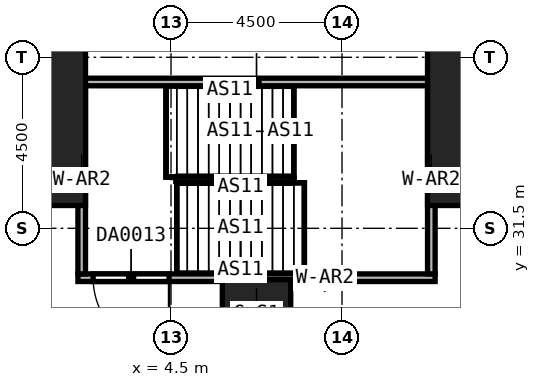
"""IFC4 building model, lengths in metres.
Left out: names, types, materials, properties, quantities, classifications, styles, units other than length and angle.
Written with IfcOpenShell. Run it as: python <this file> out.ifc"""

import sys

from ifc_helpers import new_model, si_unit, direction, frame, frame_2d, origin, origin_2d, place, context, subcontext, project, spatial, rectangle, extrude, element, fill, save


model = new_model("IFC4")
c1 = context("Model", 3, precision=1e-05, world=origin(), true_north=direction((0.0, 1.0)))
c2 = subcontext(c1, "Body", "Model", "MODEL_VIEW")
j1 = project(units=[si_unit("LENGTHUNIT", "METRE"), si_unit("PLANEANGLEUNIT", "RADIAN")], contexts=[c1])
p1 = place(None, origin())
s1 = spatial("IfcSite", under=j1, at=p1, CompositionType="ELEMENT")
p2 = place(p1, origin())
s2 = spatial("IfcBuilding", under=s1, at=p2, CompositionType="ELEMENT")
p3 = place(p2, origin())
s3 = spatial("IfcBuildingStorey", under=s2, at=p3, CompositionType="ELEMENT", Elevation=0.0)
for number, where, z_axis, x_axis in (
    (1, (0.0, 35.55, 0.0), (0.0, 0.0, 1.0), (1.0, 0.0, 0.0)),
    (2, (13.5, 35.55, 0.0), (0.0, 0.0, 1.0), (1.0, 0.0, 0.0)),
):
    element("IfcColumn", number, at=place(p3, frame(where, z_axis=z_axis, x_axis=x_axis)), inside=s3, PredefinedType="COLUMN", context=c2, shape_type="SweptSolid", body=[
        extrude(rectangle(XDim=4.5, YDim=6.9, at=origin_2d()), origin(), (0.0, 0.0, 1.0), 12.0),
    ])
p4 = place(p3, frame((6.75, 29.25, 0.0), z_axis=(0.0, 0.0, 1.0), x_axis=(1.0, 0.0, 0.0)))
e3 = element("IfcColumn", 3, at=p4, inside=s3, PredefinedType="COLUMN", context=c2, shape_type="SweptSolid", body=[
    extrude(rectangle(XDim=1.8, YDim=1.8, at=origin_2d()), origin(), (0.0, 0.0, 1.0), 12.0),
])
p5 = place(p3, frame((11.45, 30.2, 0.0), z_axis=(0.0, 0.0, 1.0), x_axis=(-1.0, 0.0, 0.0)))
e4 = element("IfcWall", 4, at=p5, inside=s3, PredefinedType="SOLIDWALL", context=c2, shape_type="SweptSolid", body=[
    extrude(rectangle(XDim=9.4, YDim=0.2, at=frame_2d((4.7, 0.0))), origin(), (0.0, 0.0, 1.0), 12.0),
])
p6 = place(p5, frame((7.0, 0.0, 0.0)))
e5 = element("IfcOpeningElement", 5, at=p6, cuts=e4, PredefinedType="OPENING", context=c2, shape_type="SweptSolid", body=[
    extrude(rectangle(XDim=2.0, YDim=2.4, at=frame_2d((1.0, 1.2))), frame((0.0, 0.1, 0.0), z_axis=(0.0, -1.0, 0.0), x_axis=(1.0, 0.0, 0.0)), (0.0, 0.0, 1.0), 0.2),
])
p7 = place(p3, frame((2.05, 35.35, 0.0), z_axis=(0.0, 0.0, 1.0), x_axis=(1.0, 0.0, 0.0)))
e6 = element("IfcWall", 6, at=p7, inside=s3, PredefinedType="SOLIDWALL", context=c2, shape_type="SweptSolid", body=[
    extrude(rectangle(XDim=9.4, YDim=0.2, at=frame_2d((4.7, 0.0))), origin(), (0.0, 0.0, 1.0), 12.0),
])
for number, where, z_axis, x_axis in (
    (7, (2.15, 30.3, 0.0), (0.0, 0.0, 1.0), (0.0, 1.0, 0.0)),
    (8, (11.35, 30.3, 0.0), (0.0, 0.0, 1.0), (0.0, 1.0, 0.0)),
):
    element("IfcWall", number, at=place(p3, frame(where, z_axis=z_axis, x_axis=x_axis)), inside=s3, PredefinedType="SOLIDWALL", context=c2, shape_type="SweptSolid", body=[
        extrude(rectangle(XDim=4.95, YDim=0.2, at=frame_2d((2.475, 0.0))), origin(), (0.0, 0.0, 1.0), 12.0),
    ])
p8 = place(p6, origin())
e9 = element("IfcDoor", 9, at=p8, inside=s3, OperationType="DOUBLE_DOOR_SINGLE_SWING", PredefinedType="DOOR", context=c2, shape_type="SweptSolid", body=[
    extrude(rectangle(XDim=2.0, YDim=2.4, at=frame_2d((1.0, 1.2))), frame((0.0, 0.025, 0.0), z_axis=(0.0, -1.0, 0.0), x_axis=(1.0, 0.0, 0.0)), (0.0, 0.0, 1.0), 0.05),
])
fill(e5, e9)
save(model, sys.argv[1])
